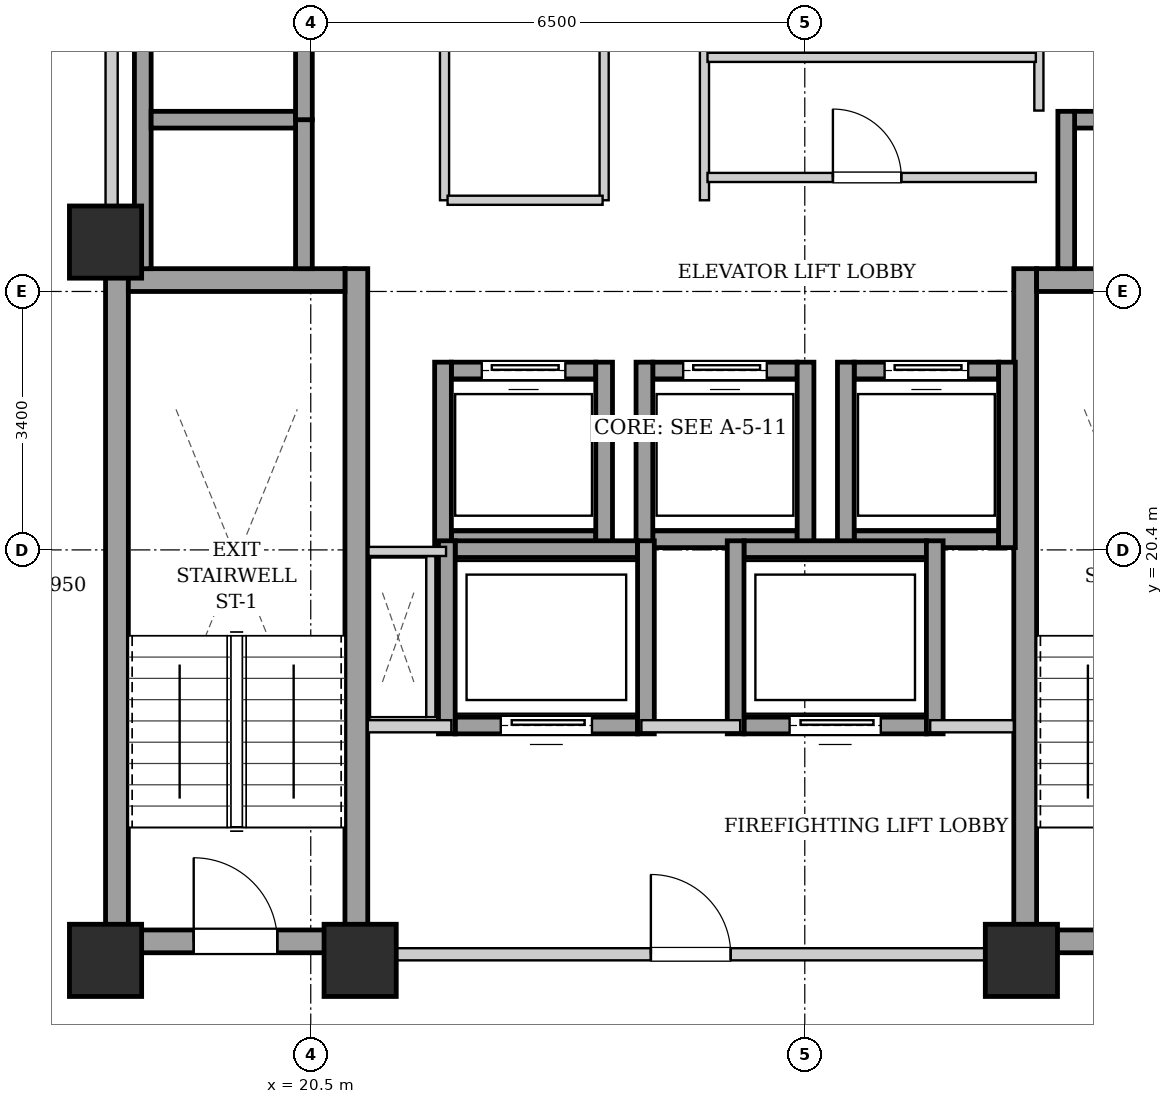
"""IFC4 building model, lengths in metres.
Left out: names, types, materials, properties, quantities, classifications, styles, units other than length and angle.
Written with IfcOpenShell. Run it as: python <this file> out.ifc"""

import sys

from ifc_helpers import new_model, si_unit, direction, frame, frame_2d, origin, origin_2d, place, context, subcontext, project, spatial, rectangle, extrude, element, fill, save


model = new_model("IFC4")
c1 = context("Model", 3, precision=1e-05, world=origin(), true_north=direction((0.0, 1.0)))
c2 = subcontext(c1, "Body", "Model", "MODEL_VIEW")
j1 = project(units=[si_unit("LENGTHUNIT", "METRE"), si_unit("PLANEANGLEUNIT", "RADIAN")], contexts=[c1])
p1 = place(None, origin())
s1 = spatial("IfcSite", under=j1, at=p1, CompositionType="ELEMENT")
p2 = place(p1, origin())
s2 = spatial("IfcBuilding", under=s1, at=p2, CompositionType="ELEMENT")
p3 = place(p2, frame((0.0, 0.0, 153.65)))
s3 = spatial("IfcBuildingStorey", under=s2, at=p3, CompositionType="ELEMENT", Elevation=153.65)
for number, where, z_axis, x_axis in (
    (1, (17.8, 15.0, 0.0), (0.0, 0.0, 1.0), (1.0, 0.0, 0.0)),
    (2, (21.15, 15.0, 0.0), (0.0, 0.0, 1.0), (1.0, 0.0, 0.0)),
    (3, (29.85, 15.0, 0.0), (0.0, 0.0, 1.0), (1.0, 0.0, 0.0)),
    (4, (17.8, 24.45, 0.0), (0.0, 0.0, 1.0), (1.0, 0.0, 0.0)),
):
    element("IfcColumn", number, at=place(p3, frame(where, z_axis=z_axis, x_axis=x_axis)), inside=s3, PredefinedType="COLUMN", context=c2, shape_type="SweptSolid", body=[
        extrude(rectangle(XDim=0.95, YDim=0.95, at=origin_2d()), origin(), (0.0, 0.0, 1.0), 3.25),
    ])
for number, where, z_axis, x_axis in (
    (5, (17.95, 15.1, 0.0), (0.0, 0.0, 1.0), (0.0, 1.0, 0.0)),
    (6, (21.1, 15.1, 0.0), (0.0, 0.0, 1.0), (0.0, 1.0, 0.0)),
):
    element("IfcWall", number, at=place(p3, frame(where, z_axis=z_axis, x_axis=x_axis)), inside=s3, PredefinedType="SHEAR", context=c2, shape_type="SweptSolid", body=[
        extrude(rectangle(XDim=9.0, YDim=0.3, at=frame_2d((4.5, 0.0))), origin(), (0.0, 0.0, 1.0), 2.99),
    ])
p4 = place(p3, frame((18.1, 23.95, 0.0), z_axis=(0.0, 0.0, 1.0), x_axis=(1.0, 0.0, 0.0)))
e7 = element("IfcWall", 7, at=p4, inside=s3, PredefinedType="SHEAR", context=c2, shape_type="SweptSolid", body=[
    extrude(rectangle(XDim=2.85, YDim=0.3, at=frame_2d((1.425, 0.0))), origin(), (0.0, 0.0, 1.0), 2.99),
])
p5 = place(p3, frame((18.1, 15.25, 0.0), z_axis=(0.0, 0.0, 1.0), x_axis=(1.0, 0.0, 0.0)))
e8 = element("IfcWall", 8, at=p5, inside=s3, PredefinedType="SHEAR", context=c2, shape_type="SweptSolid", body=[
    extrude(rectangle(XDim=2.85, YDim=0.3, at=frame_2d((1.425, 0.0))), origin(), (0.0, 0.0, 1.0), 2.99),
])
p6 = place(p5, frame((0.86, 0.0, 0.0)))
e9 = element("IfcOpeningElement", 9, at=p6, cuts=e8, PredefinedType="OPENING", context=c2, shape_type="SweptSolid", body=[
    extrude(rectangle(XDim=1.1, YDim=2.05, at=frame_2d((0.55, 1.025))), frame((0.0, 0.16, 0.0), z_axis=(0.0, -1.0, 0.0), x_axis=(1.0, 0.0, 0.0)), (0.0, 0.0, 1.0), 0.32),
])
p7 = place(p3, frame((29.9, 15.1, 0.0), z_axis=(0.0, 0.0, 1.0), x_axis=(0.0, 1.0, 0.0)))
e10 = element("IfcWall", 10, at=p7, inside=s3, PredefinedType="SHEAR", context=c2, shape_type="SweptSolid", body=[
    extrude(rectangle(XDim=9.0, YDim=0.3, at=frame_2d((4.5, 0.0))), origin(), (0.0, 0.0, 1.0), 2.99),
])
p8 = place(p3, frame((30.05, 23.95, 0.0), z_axis=(0.0, 0.0, 1.0), x_axis=(1.0, 0.0, 0.0)))
e11 = element("IfcWall", 11, at=p8, inside=s3, PredefinedType="SHEAR", context=c2, shape_type="SweptSolid", body=[
    extrude(rectangle(XDim=2.85, YDim=0.3, at=frame_2d((1.425, 0.0))), origin(), (0.0, 0.0, 1.0), 2.99),
])
p9 = place(p3, frame((30.05, 15.25, 0.0), z_axis=(0.0, 0.0, 1.0), x_axis=(1.0, 0.0, 0.0)))
e12 = element("IfcWall", 12, at=p9, inside=s3, PredefinedType="SHEAR", context=c2, shape_type="SweptSolid", body=[
    extrude(rectangle(XDim=2.85, YDim=0.3, at=frame_2d((1.425, 0.0))), origin(), (0.0, 0.0, 1.0), 2.99),
])
p10 = place(p9, frame((0.86, 0.0, 0.0)))
e13 = element("IfcOpeningElement", 13, at=p10, cuts=e12, PredefinedType="OPENING", context=c2, shape_type="SweptSolid", body=[
    extrude(rectangle(XDim=1.1, YDim=2.05, at=frame_2d((0.55, 1.025))), frame((0.0, 0.16, 0.0), z_axis=(0.0, -1.0, 0.0), x_axis=(1.0, 0.0, 0.0)), (0.0, 0.0, 1.0), 0.32),
])
p11 = place(p3, frame((22.35, 20.54, 0.0), z_axis=(0.0, 0.0, 1.0), x_axis=(1.0, 0.0, 0.0)))
e14 = element("IfcWall", 14, at=p11, inside=s3, PredefinedType="SHEAR", context=c2, shape_type="SweptSolid", body=[
    extrude(rectangle(XDim=1.9, YDim=0.22, at=frame_2d((0.95, 0.0))), origin(), (0.0, 0.0, 1.0), 2.99),
])
p12 = place(p3, frame((22.35, 22.76, 0.0), z_axis=(0.0, 0.0, 1.0), x_axis=(1.0, 0.0, 0.0)))
e15 = element("IfcWall", 15, at=p12, inside=s3, PredefinedType="SHEAR", context=c2, shape_type="SweptSolid", body=[
    extrude(rectangle(XDim=1.9, YDim=0.22, at=frame_2d((0.95, 0.0))), origin(), (0.0, 0.0, 1.0), 2.99),
])
p13 = place(p12, frame((0.4, 0.0, 0.0)))
e16 = element("IfcOpeningElement", 16, at=p13, cuts=e15, PredefinedType="OPENING", context=c2, shape_type="SweptSolid", body=[
    extrude(rectangle(XDim=1.1, YDim=2.15, at=frame_2d((0.55, 1.075))), frame((0.0, 0.12, 0.0), z_axis=(0.0, -1.0, 0.0), x_axis=(1.0, 0.0, 0.0)), (0.0, 0.0, 1.0), 0.24),
])
for number, where, z_axis, x_axis in (
    (17, (22.24, 20.43, 0.0), (0.0, 0.0, 1.0), (0.0, 1.0, 0.0)),
    (18, (24.36, 20.43, 0.0), (0.0, 0.0, 1.0), (0.0, 1.0, 0.0)),
):
    element("IfcWall", number, at=place(p3, frame(where, z_axis=z_axis, x_axis=x_axis)), inside=s3, PredefinedType="SHEAR", context=c2, shape_type="SweptSolid", body=[
        extrude(rectangle(XDim=2.44, YDim=0.22, at=frame_2d((1.22, 0.0))), origin(), (0.0, 0.0, 1.0), 2.99),
    ])
p14 = place(p3, frame((25.0, 20.54, 0.0), z_axis=(0.0, 0.0, 1.0), x_axis=(1.0, 0.0, 0.0)))
e19 = element("IfcWall", 19, at=p14, inside=s3, PredefinedType="SHEAR", context=c2, shape_type="SweptSolid", body=[
    extrude(rectangle(XDim=1.9, YDim=0.22, at=frame_2d((0.95, 0.0))), origin(), (0.0, 0.0, 1.0), 2.99),
])
p15 = place(p3, frame((25.0, 22.76, 0.0), z_axis=(0.0, 0.0, 1.0), x_axis=(1.0, 0.0, 0.0)))
e20 = element("IfcWall", 20, at=p15, inside=s3, PredefinedType="SHEAR", context=c2, shape_type="SweptSolid", body=[
    extrude(rectangle(XDim=1.9, YDim=0.22, at=frame_2d((0.95, 0.0))), origin(), (0.0, 0.0, 1.0), 2.99),
])
p16 = place(p15, frame((0.4, 0.0, 0.0)))
e21 = element("IfcOpeningElement", 21, at=p16, cuts=e20, PredefinedType="OPENING", context=c2, shape_type="SweptSolid", body=[
    extrude(rectangle(XDim=1.1, YDim=2.15, at=frame_2d((0.55, 1.075))), frame((0.0, 0.12, 0.0), z_axis=(0.0, -1.0, 0.0), x_axis=(1.0, 0.0, 0.0)), (0.0, 0.0, 1.0), 0.24),
])
for number, where, z_axis, x_axis in (
    (22, (24.89, 20.43, 0.0), (0.0, 0.0, 1.0), (0.0, 1.0, 0.0)),
    (23, (27.01, 20.43, 0.0), (0.0, 0.0, 1.0), (0.0, 1.0, 0.0)),
):
    element("IfcWall", number, at=place(p3, frame(where, z_axis=z_axis, x_axis=x_axis)), inside=s3, PredefinedType="SHEAR", context=c2, shape_type="SweptSolid", body=[
        extrude(rectangle(XDim=2.44, YDim=0.22, at=frame_2d((1.22, 0.0))), origin(), (0.0, 0.0, 1.0), 2.99),
    ])
p17 = place(p3, frame((27.65, 20.54, 0.0), z_axis=(0.0, 0.0, 1.0), x_axis=(1.0, 0.0, 0.0)))
e24 = element("IfcWall", 24, at=p17, inside=s3, PredefinedType="SHEAR", context=c2, shape_type="SweptSolid", body=[
    extrude(rectangle(XDim=1.9, YDim=0.22, at=frame_2d((0.95, 0.0))), origin(), (0.0, 0.0, 1.0), 2.99),
])
p18 = place(p3, frame((27.65, 22.76, 0.0), z_axis=(0.0, 0.0, 1.0), x_axis=(1.0, 0.0, 0.0)))
e25 = element("IfcWall", 25, at=p18, inside=s3, PredefinedType="SHEAR", context=c2, shape_type="SweptSolid", body=[
    extrude(rectangle(XDim=1.9, YDim=0.22, at=frame_2d((0.95, 0.0))), origin(), (0.0, 0.0, 1.0), 2.99),
])
p19 = place(p18, frame((0.4, 0.0, 0.0)))
e26 = element("IfcOpeningElement", 26, at=p19, cuts=e25, PredefinedType="OPENING", context=c2, shape_type="SweptSolid", body=[
    extrude(rectangle(XDim=1.1, YDim=2.15, at=frame_2d((0.55, 1.075))), frame((0.0, 0.12, 0.0), z_axis=(0.0, -1.0, 0.0), x_axis=(1.0, 0.0, 0.0)), (0.0, 0.0, 1.0), 0.24),
])
for number, where, z_axis, x_axis in (
    (27, (27.54, 20.43, 0.0), (0.0, 0.0, 1.0), (0.0, 1.0, 0.0)),
    (28, (29.66, 20.43, 0.0), (0.0, 0.0, 1.0), (0.0, 1.0, 0.0)),
):
    element("IfcWall", number, at=place(p3, frame(where, z_axis=z_axis, x_axis=x_axis)), inside=s3, PredefinedType="SHEAR", context=c2, shape_type="SweptSolid", body=[
        extrude(rectangle(XDim=2.44, YDim=0.22, at=frame_2d((1.22, 0.0))), origin(), (0.0, 0.0, 1.0), 2.99),
    ])
p20 = place(p3, frame((18.29, 24.1, 0.0), z_axis=(0.0, 0.0, 1.0), x_axis=(0.0, 1.0, 0.0)))
e29 = element("IfcWall", 29, at=p20, inside=s3, PredefinedType="SHEAR", context=c2, shape_type="SweptSolid", body=[
    extrude(rectangle(XDim=4.14, YDim=0.22, at=frame_2d((2.07, 0.0))), origin(), (0.0, 0.0, 1.0), 2.99),
])
p21 = place(p3, frame((20.41, 24.1, 0.0), z_axis=(0.0, 0.0, 1.0), x_axis=(0.0, 1.0, 0.0)))
e30 = element("IfcWall", 30, at=p21, inside=s3, PredefinedType="SHEAR", context=c2, shape_type="SweptSolid", body=[
    extrude(rectangle(XDim=1.96, YDim=0.22, at=frame_2d((0.98, 0.0))), origin(), (0.0, 0.0, 1.0), 2.99),
])
p22 = place(p3, frame((18.4, 26.06, 0.0), z_axis=(0.0, 0.0, 1.0), x_axis=(1.0, 0.0, 0.0)))
e31 = element("IfcWall", 31, at=p22, inside=s3, PredefinedType="SHEAR", context=c2, shape_type="SweptSolid", body=[
    extrude(rectangle(XDim=1.9, YDim=0.22, at=frame_2d((0.95, 0.0))), origin(), (0.0, 0.0, 1.0), 2.99),
])
p23 = place(p3, frame((20.41, 26.06, 0.0), z_axis=(0.0, 0.0, 1.0), x_axis=(0.0, 1.0, 0.0)))
e32 = element("IfcWall", 32, at=p23, inside=s3, PredefinedType="SHEAR", context=c2, shape_type="SweptSolid", body=[
    extrude(rectangle(XDim=2.18, YDim=0.22, at=frame_2d((1.09, 0.0))), origin(), (0.0, 0.0, 1.0), 2.99),
])
p24 = place(p3, frame((30.55, 26.06, 0.0), z_axis=(0.0, 0.0, 1.0), x_axis=(1.0, 0.0, 0.0)))
e33 = element("IfcWall", 33, at=p24, inside=s3, PredefinedType="SHEAR", context=c2, shape_type="SweptSolid", body=[
    extrude(rectangle(XDim=1.9, YDim=0.22, at=frame_2d((0.95, 0.0))), origin(), (0.0, 0.0, 1.0), 2.99),
])
p25 = place(p3, frame((30.44, 24.1, 0.0), z_axis=(0.0, 0.0, 1.0), x_axis=(0.0, 1.0, 0.0)))
e34 = element("IfcWall", 34, at=p25, inside=s3, PredefinedType="SHEAR", context=c2, shape_type="SweptSolid", body=[
    extrude(rectangle(XDim=2.07, YDim=0.22, at=frame_2d((1.035, 0.0))), origin(), (0.0, 0.0, 1.0), 2.99),
])
p26 = place(p3, frame((22.4, 18.09, 0.0), z_axis=(0.0, 0.0, 1.0), x_axis=(1.0, 0.0, 0.0)))
e35 = element("IfcWall", 35, at=p26, inside=s3, PredefinedType="SHEAR", context=c2, shape_type="SweptSolid", body=[
    extrude(rectangle(XDim=2.4, YDim=0.22, at=frame_2d((1.2, 0.0))), origin(), (0.0, 0.0, 1.0), 2.99),
])
p27 = place(p26, frame((0.6, 0.0, 0.0)))
e36 = element("IfcOpeningElement", 36, at=p27, cuts=e35, PredefinedType="OPENING", context=c2, shape_type="SweptSolid", body=[
    extrude(rectangle(XDim=1.2, YDim=2.15, at=frame_2d((0.6, 1.075))), frame((0.0, 0.12, 0.0), z_axis=(0.0, -1.0, 0.0), x_axis=(1.0, 0.0, 0.0)), (0.0, 0.0, 1.0), 0.24),
])
p28 = place(p3, frame((22.4, 20.41, 0.0), z_axis=(0.0, 0.0, 1.0), x_axis=(1.0, 0.0, 0.0)))
e37 = element("IfcWall", 37, at=p28, inside=s3, PredefinedType="SHEAR", context=c2, shape_type="SweptSolid", body=[
    extrude(rectangle(XDim=2.4, YDim=0.22, at=frame_2d((1.2, 0.0))), origin(), (0.0, 0.0, 1.0), 2.99),
])
for number, where, z_axis, x_axis in (
    (38, (22.29, 17.98, 0.0), (0.0, 0.0, 1.0), (0.0, 1.0, 0.0)),
    (39, (24.91, 17.98, 0.0), (0.0, 0.0, 1.0), (0.0, 1.0, 0.0)),
):
    element("IfcWall", number, at=place(p3, frame(where, z_axis=z_axis, x_axis=x_axis)), inside=s3, PredefinedType="SHEAR", context=c2, shape_type="SweptSolid", body=[
        extrude(rectangle(XDim=2.54, YDim=0.22, at=frame_2d((1.27, 0.0))), origin(), (0.0, 0.0, 1.0), 2.99),
    ])
p29 = place(p3, frame((26.2, 18.09, 0.0), z_axis=(0.0, 0.0, 1.0), x_axis=(1.0, 0.0, 0.0)))
e40 = element("IfcWall", 40, at=p29, inside=s3, PredefinedType="SHEAR", context=c2, shape_type="SweptSolid", body=[
    extrude(rectangle(XDim=2.4, YDim=0.22, at=frame_2d((1.2, 0.0))), origin(), (0.0, 0.0, 1.0), 2.99),
])
p30 = place(p29, frame((0.6, 0.0, 0.0)))
e41 = element("IfcOpeningElement", 41, at=p30, cuts=e40, PredefinedType="OPENING", context=c2, shape_type="SweptSolid", body=[
    extrude(rectangle(XDim=1.2, YDim=2.15, at=frame_2d((0.6, 1.075))), frame((0.0, 0.12, 0.0), z_axis=(0.0, -1.0, 0.0), x_axis=(1.0, 0.0, 0.0)), (0.0, 0.0, 1.0), 0.24),
])
p31 = place(p3, frame((26.2, 20.41, 0.0), z_axis=(0.0, 0.0, 1.0), x_axis=(1.0, 0.0, 0.0)))
e42 = element("IfcWall", 42, at=p31, inside=s3, PredefinedType="SHEAR", context=c2, shape_type="SweptSolid", body=[
    extrude(rectangle(XDim=2.4, YDim=0.22, at=frame_2d((1.2, 0.0))), origin(), (0.0, 0.0, 1.0), 2.99),
])
for number, where, z_axis, x_axis in (
    (43, (26.09, 17.98, 0.0), (0.0, 0.0, 1.0), (0.0, 1.0, 0.0)),
    (44, (28.71, 17.98, 0.0), (0.0, 0.0, 1.0), (0.0, 1.0, 0.0)),
):
    element("IfcWall", number, at=place(p3, frame(where, z_axis=z_axis, x_axis=x_axis)), inside=s3, PredefinedType="SHEAR", context=c2, shape_type="SweptSolid", body=[
        extrude(rectangle(XDim=2.54, YDim=0.22, at=frame_2d((1.27, 0.0))), origin(), (0.0, 0.0, 1.0), 2.99),
    ])
p32 = place(p3, frame((21.25, 15.08, 0.0), z_axis=(0.0, 0.0, 1.0), x_axis=(1.0, 0.0, 0.0)))
e45 = element("IfcWall", 45, at=p32, inside=s3, PredefinedType="PARTITIONING", context=c2, shape_type="SweptSolid", body=[
    extrude(rectangle(XDim=8.5, YDim=0.16, at=frame_2d((4.25, 0.0))), origin(), (0.0, 0.0, 1.0), 2.442),
])
p33 = place(p32, frame((3.725, 0.0, 0.0)))
e46 = element("IfcOpeningElement", 46, at=p33, cuts=e45, PredefinedType="OPENING", context=c2, shape_type="SweptSolid", body=[
    extrude(rectangle(XDim=1.05, YDim=2.05, at=frame_2d((0.525, 1.025))), frame((0.0, 0.09, 0.0), z_axis=(0.0, -1.0, 0.0), x_axis=(1.0, 0.0, 0.0)), (0.0, 0.0, 1.0), 0.18),
])
p34 = place(p3, frame((21.25, 18.08, 0.0), z_axis=(0.0, 0.0, 1.0), x_axis=(1.0, 0.0, 0.0)))
e47 = element("IfcWall", 47, at=p34, inside=s3, PredefinedType="PARTITIONING", context=c2, shape_type="SweptSolid", body=[
    extrude(rectangle(XDim=1.1, YDim=0.16, at=frame_2d((0.55, 0.0))), origin(), (0.0, 0.0, 1.0), 2.99),
])
p35 = place(p3, frame((24.85, 18.08, 0.0), z_axis=(0.0, 0.0, 1.0), x_axis=(1.0, 0.0, 0.0)))
e48 = element("IfcWall", 48, at=p35, inside=s3, PredefinedType="PARTITIONING", context=c2, shape_type="SweptSolid", body=[
    extrude(rectangle(XDim=1.3, YDim=0.16, at=frame_2d((0.65, 0.0))), origin(), (0.0, 0.0, 1.0), 2.99),
])
p36 = place(p3, frame((28.65, 18.08, 0.0), z_axis=(0.0, 0.0, 1.0), x_axis=(1.0, 0.0, 0.0)))
e49 = element("IfcWall", 49, at=p36, inside=s3, PredefinedType="PARTITIONING", context=c2, shape_type="SweptSolid", body=[
    extrude(rectangle(XDim=1.1, YDim=0.16, at=frame_2d((0.55, 0.0))), origin(), (0.0, 0.0, 1.0), 2.99),
])
p37 = place(p3, frame((17.88, 24.12, 0.0), z_axis=(0.0, 0.0, 1.0), x_axis=(0.0, 1.0, 0.0)))
e50 = element("IfcWall", 50, at=p37, inside=s3, PredefinedType="PARTITIONING", context=c2, shape_type="SweptSolid", body=[
    extrude(rectangle(XDim=4.76, YDim=0.16, at=frame_2d((2.38, 0.0))), origin(), (0.0, 0.0, 1.0), 2.99),
])
p38 = place(p3, frame((22.08, 18.2, 0.0), z_axis=(0.0, 0.0, 1.0), x_axis=(0.0, 1.0, 0.0)))
e51 = element("IfcWall", 51, at=p38, inside=s3, PredefinedType="PARTITIONING", context=c2, shape_type="SweptSolid", body=[
    extrude(rectangle(XDim=2.12, YDim=0.12, at=frame_2d((1.06, 0.0))), origin(), (0.0, 0.0, 1.0), 2.99),
])
p39 = place(p3, frame((22.28, 20.38, 0.0), z_axis=(0.0, 0.0, 1.0), x_axis=(-1.0, 0.0, 0.0)))
e52 = element("IfcWall", 52, at=p39, inside=s3, PredefinedType="PARTITIONING", context=c2, shape_type="SweptSolid", body=[
    extrude(rectangle(XDim=1.02, YDim=0.12, at=frame_2d((0.51, 0.0))), origin(), (0.0, 0.0, 1.0), 2.99),
])
for number, where, z_axis, x_axis in (
    (53, (24.36, 25.0, 0.0), (0.0, 0.0, 1.0), (0.0, 1.0, 0.0)),
    (54, (25.68, 25.0, 0.0), (0.0, 0.0, 1.0), (0.0, 1.0, 0.0)),
):
    element("IfcWall", number, at=place(p3, frame(where, z_axis=z_axis, x_axis=x_axis)), inside=s3, PredefinedType="PARTITIONING", context=c2, shape_type="SweptSolid", body=[
        extrude(rectangle(XDim=3.87, YDim=0.12, at=frame_2d((1.935, 0.0))), origin(), (0.0, 0.0, 1.0), 2.99),
    ])
p40 = place(p3, frame((30.08, 26.18, 0.0), z_axis=(0.0, 0.0, 1.0), x_axis=(0.0, 1.0, 0.0)))
e55 = element("IfcWall", 55, at=p40, inside=s3, PredefinedType="PARTITIONING", context=c2, shape_type="SweptSolid", body=[
    extrude(rectangle(XDim=2.68, YDim=0.12, at=frame_2d((1.34, 0.0))), origin(), (0.0, 0.0, 1.0), 2.99),
])
p41 = place(p3, frame((22.26, 25.0, 0.0), z_axis=(0.0, 0.0, 1.0), x_axis=(0.0, 1.0, 0.0)))
e56 = element("IfcWall", 56, at=p41, inside=s3, PredefinedType="PARTITIONING", context=c2, shape_type="SweptSolid", body=[
    extrude(rectangle(XDim=3.86, YDim=0.12, at=frame_2d((1.93, 0.0))), origin(), (0.0, 0.0, 1.0), 2.99),
])
p42 = place(p3, frame((22.3, 25.0, 0.0), z_axis=(0.0, 0.0, 1.0), x_axis=(1.0, 0.0, 0.0)))
e57 = element("IfcWall", 57, at=p42, inside=s3, PredefinedType="PARTITIONING", context=c2, shape_type="SweptSolid", body=[
    extrude(rectangle(XDim=2.04, YDim=0.12, at=frame_2d((1.02, 0.0))), origin(), (0.0, 0.0, 1.0), 2.99),
])
p43 = place(p3, frame((25.72, 26.88, 0.0), z_axis=(0.0, 0.0, 1.0), x_axis=(1.0, 0.0, 0.0)))
e58 = element("IfcWall", 58, at=p43, inside=s3, PredefinedType="PARTITIONING", context=c2, shape_type="SweptSolid", body=[
    extrude(rectangle(XDim=4.32, YDim=0.12, at=frame_2d((2.16, 0.0))), origin(), (0.0, 0.0, 1.0), 2.99),
])
p44 = place(p3, frame((25.72, 25.3, 0.0), z_axis=(0.0, 0.0, 1.0), x_axis=(1.0, 0.0, 0.0)))
e59 = element("IfcWall", 59, at=p44, inside=s3, PredefinedType="PARTITIONING", context=c2, shape_type="SweptSolid", body=[
    extrude(rectangle(XDim=4.32, YDim=0.12, at=frame_2d((2.16, 0.0))), origin(), (0.0, 0.0, 1.0), 2.99),
])
p45 = place(p44, frame((1.65, 0.0, 0.0)))
e60 = element("IfcOpeningElement", 60, at=p45, cuts=e59, PredefinedType="OPENING", context=c2, shape_type="SweptSolid", body=[
    extrude(rectangle(XDim=0.9, YDim=2.05, at=frame_2d((0.45, 1.025))), frame((0.0, 0.07, 0.0), z_axis=(0.0, -1.0, 0.0), x_axis=(1.0, 0.0, 0.0)), (0.0, 0.0, 1.0), 0.14),
])
p46 = place(p6, origin())
e61 = element("IfcDoor", 61, at=p46, inside=s3, OperationType="SINGLE_SWING_LEFT", PredefinedType="DOOR", context=c2, shape_type="SweptSolid", body=[
    extrude(rectangle(XDim=1.1, YDim=2.05, at=frame_2d((0.55, 1.025))), frame((0.0, 0.025, 0.0), z_axis=(0.0, -1.0, 0.0), x_axis=(1.0, 0.0, 0.0)), (0.0, 0.0, 1.0), 0.05),
])
fill(e9, e61)
p47 = place(p13, origin())
e62 = element("IfcDoor", 62, at=p47, inside=s3, OperationType="SLIDING_TO_LEFT", PredefinedType="DOOR", context=c2, shape_type="SweptSolid", body=[
    extrude(rectangle(XDim=1.1, YDim=2.15, at=frame_2d((0.55, 1.075))), frame((0.0, 0.025, 0.0), z_axis=(0.0, -1.0, 0.0), x_axis=(1.0, 0.0, 0.0)), (0.0, 0.0, 1.0), 0.05),
])
fill(e16, e62)
p48 = place(p16, origin())
e63 = element("IfcDoor", 63, at=p48, inside=s3, OperationType="SLIDING_TO_LEFT", PredefinedType="DOOR", context=c2, shape_type="SweptSolid", body=[
    extrude(rectangle(XDim=1.1, YDim=2.15, at=frame_2d((0.55, 1.075))), frame((0.0, 0.025, 0.0), z_axis=(0.0, -1.0, 0.0), x_axis=(1.0, 0.0, 0.0)), (0.0, 0.0, 1.0), 0.05),
])
fill(e21, e63)
p49 = place(p19, origin())
e64 = element("IfcDoor", 64, at=p49, inside=s3, OperationType="SLIDING_TO_LEFT", PredefinedType="DOOR", context=c2, shape_type="SweptSolid", body=[
    extrude(rectangle(XDim=1.1, YDim=2.15, at=frame_2d((0.55, 1.075))), frame((0.0, 0.025, 0.0), z_axis=(0.0, -1.0, 0.0), x_axis=(1.0, 0.0, 0.0)), (0.0, 0.0, 1.0), 0.05),
])
fill(e26, e64)
p50 = place(p27, origin())
e65 = element("IfcDoor", 65, at=p50, inside=s3, OperationType="SLIDING_TO_LEFT", PredefinedType="DOOR", context=c2, shape_type="SweptSolid", body=[
    extrude(rectangle(XDim=1.2, YDim=2.15, at=frame_2d((0.6, 1.075))), frame((0.0, 0.025, 0.0), z_axis=(0.0, -1.0, 0.0), x_axis=(1.0, 0.0, 0.0)), (0.0, 0.0, 1.0), 0.05),
])
fill(e36, e65)
p51 = place(p30, origin())
e66 = element("IfcDoor", 66, at=p51, inside=s3, OperationType="SLIDING_TO_LEFT", PredefinedType="DOOR", context=c2, shape_type="SweptSolid", body=[
    extrude(rectangle(XDim=1.2, YDim=2.15, at=frame_2d((0.6, 1.075))), frame((0.0, 0.025, 0.0), z_axis=(0.0, -1.0, 0.0), x_axis=(1.0, 0.0, 0.0)), (0.0, 0.0, 1.0), 0.05),
])
fill(e41, e66)
p52 = place(p33, origin())
e67 = element("IfcDoor", 67, at=p52, inside=s3, OperationType="SINGLE_SWING_LEFT", PredefinedType="DOOR", context=c2, shape_type="SweptSolid", body=[
    extrude(rectangle(XDim=1.05, YDim=2.05, at=frame_2d((0.525, 1.025))), frame((0.0, 0.025, 0.0), z_axis=(0.0, -1.0, 0.0), x_axis=(1.0, 0.0, 0.0)), (0.0, 0.0, 1.0), 0.05),
])
fill(e46, e67)
p53 = place(p45, origin())
e68 = element("IfcDoor", 68, at=p53, inside=s3, OperationType="SINGLE_SWING_LEFT", PredefinedType="DOOR", context=c2, shape_type="SweptSolid", body=[
    extrude(rectangle(XDim=0.9, YDim=2.05, at=frame_2d((0.45, 1.025))), frame((0.0, 0.025, 0.0), z_axis=(0.0, -1.0, 0.0), x_axis=(1.0, 0.0, 0.0)), (0.0, 0.0, 1.0), 0.05),
])
fill(e60, e68)
save(model, sys.argv[1])
